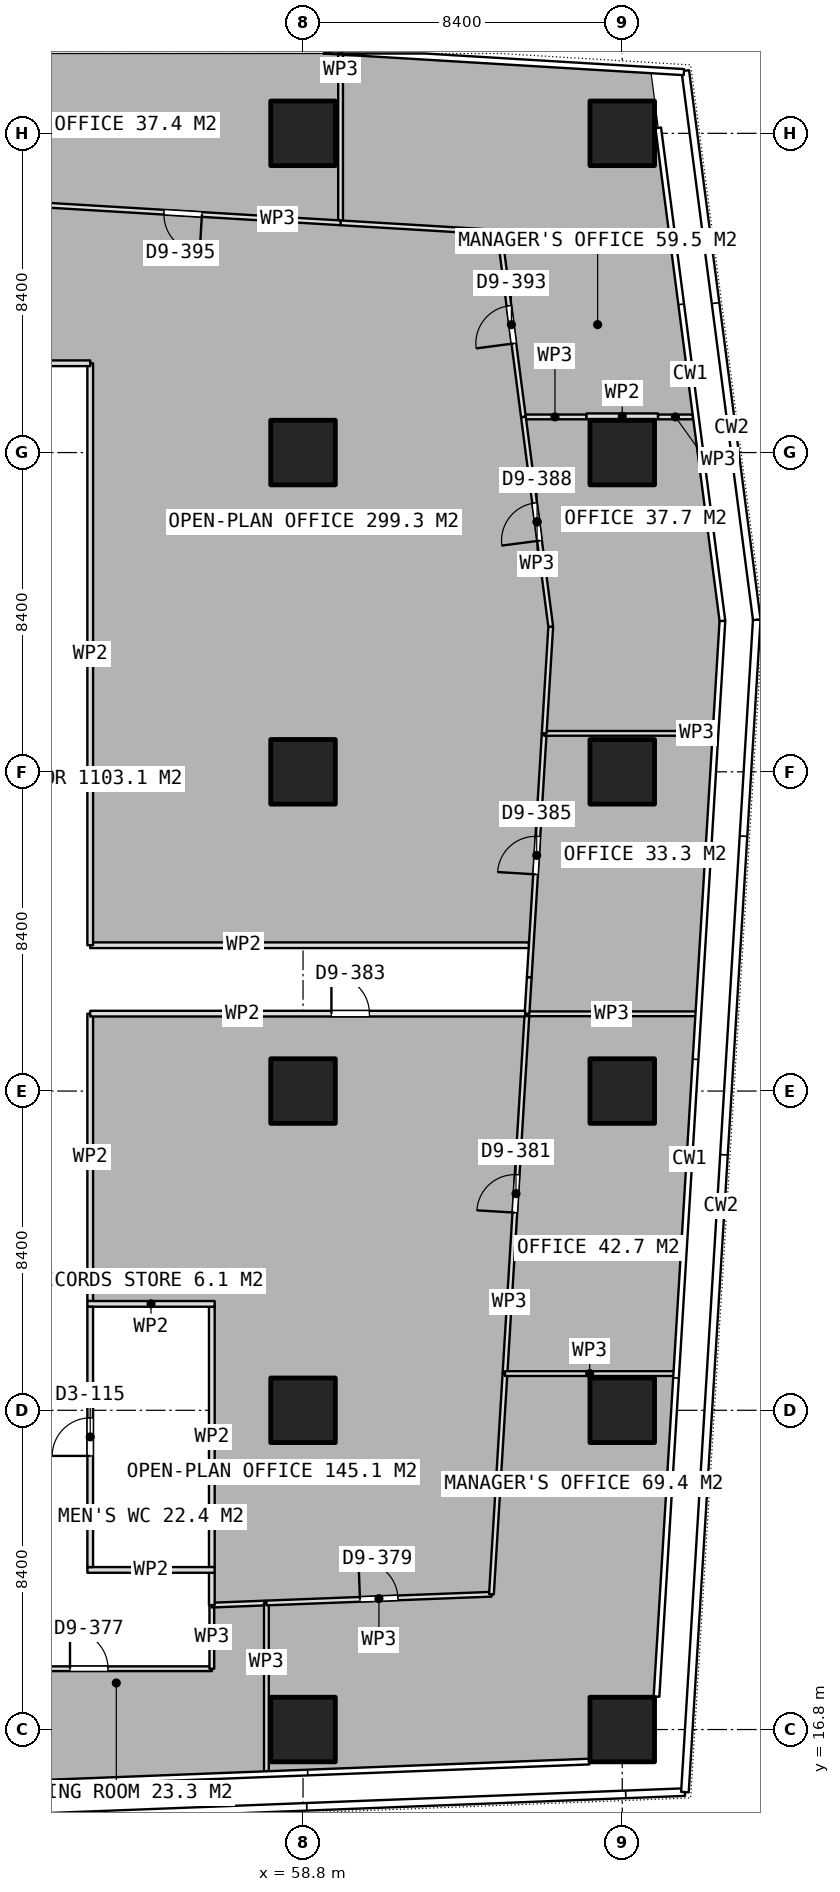
"""IFC4 building model, lengths in metres.
Left out: names, types, materials, properties, quantities, classifications, styles, units other than length and angle.
Written with IfcOpenShell. Run it as: python <this file> out.ifc"""

import sys

from ifc_helpers import new_model, si_unit, direction, frame, frame_2d, origin, origin_2d, place, context, subcontext, project, spatial, rectangle, extrude, element, fill, save


model = new_model("IFC4")
c1 = context("Model", 3, precision=1e-05, world=origin(), true_north=direction((0.0, 1.0)))
c2 = subcontext(c1, "Body", "Model", "MODEL_VIEW")
j1 = project(units=[si_unit("LENGTHUNIT", "METRE"), si_unit("PLANEANGLEUNIT", "RADIAN")], contexts=[c1])
p1 = place(None, origin())
s1 = spatial("IfcSite", under=j1, at=p1, CompositionType="ELEMENT")
p2 = place(p1, origin())
s2 = spatial("IfcBuilding", under=s1, at=p2, CompositionType="ELEMENT")
p3 = place(p2, frame((0.0, 0.0, 110.3)))
s3 = spatial("IfcBuildingStorey", under=s2, at=p3, CompositionType="ELEMENT", Elevation=110.3)
for number, where, z_axis, x_axis in (
    (1, (58.8, 16.8, 0.0), (0.0, 0.0, 1.0), (1.0, 0.0, 0.0)),
    (2, (58.8, 25.2, 0.0), (0.0, 0.0, 1.0), (1.0, 0.0, 0.0)),
    (3, (58.8, 33.6, 0.0), (0.0, 0.0, 1.0), (1.0, 0.0, 0.0)),
    (4, (58.8, 42.0, 0.0), (0.0, 0.0, 1.0), (1.0, 0.0, 0.0)),
    (5, (58.8, 50.4, 0.0), (0.0, 0.0, 1.0), (1.0, 0.0, 0.0)),
    (6, (58.8, 58.8, 0.0), (0.0, 0.0, 1.0), (1.0, 0.0, 0.0)),
    (7, (67.2, 16.8, 0.0), (0.0, 0.0, 1.0), (1.0, 0.0, 0.0)),
    (8, (67.2, 25.2, 0.0), (0.0, 0.0, 1.0), (1.0, 0.0, 0.0)),
    (9, (67.2, 33.6, 0.0), (0.0, 0.0, 1.0), (1.0, 0.0, 0.0)),
    (10, (67.2, 42.0, 0.0), (0.0, 0.0, 1.0), (1.0, 0.0, 0.0)),
    (11, (67.2, 50.4, 0.0), (0.0, 0.0, 1.0), (1.0, 0.0, 0.0)),
    (12, (67.2, 58.8, 0.0), (0.0, 0.0, 1.0), (1.0, 0.0, 0.0)),
):
    element("IfcColumn", number, at=place(p3, frame(where, z_axis=z_axis, x_axis=x_axis)), inside=s3, PredefinedType="COLUMN", context=c2, shape_type="SweptSolid", body=[
        extrude(rectangle(XDim=1.7, YDim=1.7, at=origin_2d()), origin(), (0.0, 0.0, 1.0), 3.75),
    ])
for number, where, z_axis, x_axis in (
    (13, (53.125, 21.0, 0.0), (0.0, 0.0, 1.0), (1.0, 0.0, 0.0)),
    (14, (53.125, 28.0, 0.0), (0.0, 0.0, 1.0), (1.0, 0.0, 0.0)),
):
    element("IfcWall", number, at=place(p3, frame(where, z_axis=z_axis, x_axis=x_axis)), inside=s3, PredefinedType="PARTITIONING", context=c2, shape_type="SweptSolid", body=[
        extrude(rectangle(XDim=3.35, YDim=0.15, at=frame_2d((1.675, 0.0))), origin(), (0.0, 0.0, 1.0), 3.5),
    ])
p4 = place(p3, frame((53.2, 21.075, 0.0), z_axis=(0.0, 0.0, 1.0), x_axis=(0.0, 1.0, 0.0)))
e15 = element("IfcWall", 15, at=p4, inside=s3, PredefinedType="PARTITIONING", context=c2, shape_type="SweptSolid", body=[
    extrude(rectangle(XDim=6.85, YDim=0.15, at=frame_2d((3.425, 0.0))), origin(), (0.0, 0.0, 1.0), 3.5),
])
p5 = place(p4, frame((2.925, 0.0, 0.0)))
e16 = element("IfcOpeningElement", 16, at=p5, cuts=e15, PredefinedType="OPENING", context=c2, shape_type="SweptSolid", body=[
    extrude(rectangle(XDim=1.0, YDim=2.1, at=frame_2d((0.5, 1.05))), frame((0.0, 0.085, 0.0), z_axis=(0.0, -1.0, 0.0), x_axis=(1.0, 0.0, 0.0)), (0.0, 0.0, 1.0), 0.17),
])
p6 = place(p3, frame((56.4, 21.075, 0.0), z_axis=(0.0, 0.0, 1.0), x_axis=(0.0, 1.0, 0.0)))
e17 = element("IfcWall", 17, at=p6, inside=s3, PredefinedType="PARTITIONING", context=c2, shape_type="SweptSolid", body=[
    extrude(rectangle(XDim=6.85, YDim=0.15, at=frame_2d((3.425, 0.0))), origin(), (0.0, 0.0, 1.0), 3.5),
])
p7 = place(p3, frame((49.937, 18.4, 0.0), z_axis=(0.0, 0.0, 1.0), x_axis=(1.0, 0.0, 0.0)))
e18 = element("IfcWall", 18, at=p7, inside=s3, PredefinedType="PARTITIONING", context=c2, shape_type="SweptSolid", body=[
    extrude(rectangle(XDim=6.463, YDim=0.125, at=frame_2d((3.231, 0.0))), origin(), (0.0, 0.0, 1.0), 3.5),
])
p8 = place(p7, frame((2.731, 0.0, 0.0)))
e19 = element("IfcOpeningElement", 19, at=p8, cuts=e18, PredefinedType="OPENING", context=c2, shape_type="SweptSolid", body=[
    extrude(rectangle(XDim=1.0, YDim=2.1, at=frame_2d((0.5, 1.05))), frame((0.0, 0.073, 0.0), z_axis=(0.0, -1.0, 0.0), x_axis=(1.0, 0.0, 0.0)), (0.0, 0.0, 1.0), 0.145),
])
p9 = place(p3, frame((56.4, 18.4, 0.0), z_axis=(0.0, 0.0, 1.0), x_axis=(0.0, 1.0, 0.0)))
e20 = element("IfcWall", 20, at=p9, inside=s3, PredefinedType="PARTITIONING", context=c2, shape_type="SweptSolid", body=[
    extrude(rectangle(XDim=1.674, YDim=0.125, at=frame_2d((0.837, 0.0))), origin(), (0.0, 0.0, 1.0), 3.5),
])
p10 = place(p3, frame((56.4, 20.074, 0.0), z_axis=(0.0, 0.0, 1.0), x_axis=(0.999242997058, 0.038902864047, 0.0)))
e21 = element("IfcWall", 21, at=p10, inside=s3, PredefinedType="PARTITIONING", context=c2, shape_type="SweptSolid", body=[
    extrude(rectangle(XDim=1.437, YDim=0.125, at=frame_2d((0.719, 0.0))), origin(), (0.0, 0.0, 1.0), 3.5),
])
p11 = place(p3, frame((57.836, 20.13, 0.0), z_axis=(0.0, 0.0, 1.0), x_axis=(0.0, -1.0, 0.0)))
e22 = element("IfcWall", 22, at=p11, inside=s3, PredefinedType="PARTITIONING", context=c2, shape_type="SweptSolid", body=[
    extrude(rectangle(XDim=4.424, YDim=0.125, at=frame_2d((2.212, 0.0))), origin(), (0.0, 0.0, 1.0), 3.5),
])
p12 = place(p3, frame((57.837, 20.13, 0.0), z_axis=(0.0, 0.0, 1.0), x_axis=(0.999244959279, 0.038852430487, 0.0)))
e23 = element("IfcWall", 23, at=p12, inside=s3, PredefinedType="PARTITIONING", context=c2, shape_type="SweptSolid", body=[
    extrude(rectangle(XDim=5.926, YDim=0.125, at=frame_2d((2.963, 0.0))), origin(), (0.0, 0.0, 1.0), 3.5),
])
p13 = place(p12, frame((2.463, 0.0, 0.0)))
e24 = element("IfcOpeningElement", 24, at=p13, cuts=e23, PredefinedType="OPENING", context=c2, shape_type="SweptSolid", body=[
    extrude(rectangle(XDim=1.0, YDim=2.1, at=frame_2d((0.5, 1.05))), frame((0.0, 0.073, 0.0), z_axis=(0.0, -1.0, 0.0), x_axis=(1.0, 0.0, 0.0)), (0.0, 0.0, 1.0), 0.145),
])
p14 = place(p3, frame((63.758, 20.36, 0.0), z_axis=(0.0, 0.0, 1.0), x_axis=(0.06119454608, 0.99812585756, 0.0)))
e25 = element("IfcWall", 25, at=p14, inside=s3, PredefinedType="PARTITIONING", context=c2, shape_type="SweptSolid", body=[
    extrude(rectangle(XDim=5.817, YDim=0.125, at=frame_2d((2.908, 0.0))), origin(), (0.0, 0.0, 1.0), 3.5),
])
p15 = place(p3, frame((64.114, 26.166, 0.0), z_axis=(0.0, 0.0, 1.0), x_axis=(1.0, 0.0, 0.0)))
e26 = element("IfcWall", 26, at=p15, inside=s3, PredefinedType="PARTITIONING", context=c2, shape_type="SweptSolid", body=[
    extrude(rectangle(XDim=4.458, YDim=0.125, at=frame_2d((2.229, 0.0))), origin(), (0.0, 0.0, 1.0), 3.5),
])
p16 = place(p3, frame((64.114, 26.167, 0.0), z_axis=(0.0, 0.0, 1.0), x_axis=(0.061165020441, 0.998127667322, 0.0)))
e27 = element("IfcWall", 27, at=p16, inside=s3, PredefinedType="PARTITIONING", context=c2, shape_type="SweptSolid", body=[
    extrude(rectangle(XDim=9.484, YDim=0.125, at=frame_2d((4.742, 0.0))), origin(), (0.0, 0.0, 1.0), 3.5),
])
p17 = place(p16, frame((4.242, 0.0, 0.0)))
e28 = element("IfcOpeningElement", 28, at=p17, cuts=e27, PredefinedType="OPENING", context=c2, shape_type="SweptSolid", body=[
    extrude(rectangle(XDim=1.0, YDim=2.1, at=frame_2d((0.5, 1.05))), frame((0.0, 0.073, 0.0), z_axis=(0.0, -1.0, 0.0), x_axis=(1.0, 0.0, 0.0)), (0.0, 0.0, 1.0), 0.145),
])
p18 = place(p3, frame((64.694, 35.633, 0.0), z_axis=(0.0, 0.0, 1.0), x_axis=(1.0, 0.0, 0.0)))
e29 = element("IfcWall", 29, at=p18, inside=s3, PredefinedType="PARTITIONING", context=c2, shape_type="SweptSolid", body=[
    extrude(rectangle(XDim=4.458, YDim=0.125, at=frame_2d((2.229, 0.0))), origin(), (0.0, 0.0, 1.0), 3.5),
])
p19 = place(p3, frame((64.753, 36.589, 0.0), z_axis=(0.0, 0.0, 1.0), x_axis=(0.061083835669, 0.998132638991, 0.0)))
e30 = element("IfcWall", 30, at=p19, inside=s3, PredefinedType="PARTITIONING", context=c2, shape_type="SweptSolid", body=[
    extrude(rectangle(XDim=6.435, YDim=0.125, at=frame_2d((3.217, 0.0))), origin(), (0.0, 0.0, 1.0), 3.5),
])
p20 = place(p19, frame((2.718, 0.0, 0.0)))
e31 = element("IfcOpeningElement", 31, at=p20, cuts=e30, PredefinedType="OPENING", context=c2, shape_type="SweptSolid", body=[
    extrude(rectangle(XDim=1.0, YDim=2.1, at=frame_2d((0.5, 1.05))), frame((0.0, 0.073, 0.0), z_axis=(0.0, -1.0, 0.0), x_axis=(1.0, 0.0, 0.0)), (0.0, 0.0, 1.0), 0.145),
])
p21 = place(p3, frame((65.146, 43.012, 0.0), z_axis=(0.0, 0.0, 1.0), x_axis=(1.0, 0.0, 0.0)))
e32 = element("IfcWall", 32, at=p21, inside=s3, PredefinedType="PARTITIONING", context=c2, shape_type="SweptSolid", body=[
    extrude(rectangle(XDim=4.458, YDim=0.125, at=frame_2d((2.229, 0.0))), origin(), (0.0, 0.0, 1.0), 3.5),
])
p22 = place(p3, frame((64.694, 35.634, 0.0), z_axis=(0.0, 0.0, 1.0), x_axis=(0.061488745964, 0.998107776806, 0.0)))
e33 = element("IfcWall", 33, at=p22, inside=s3, PredefinedType="PARTITIONING", context=c2, shape_type="SweptSolid", body=[
    extrude(rectangle(XDim=0.957, YDim=0.125, at=frame_2d((0.479, 0.0))), origin(), (0.0, 0.0, 1.0), 3.5),
])
p23 = place(p3, frame((64.599, 51.338, 0.0), z_axis=(0.0, 0.0, 1.0), x_axis=(1.0, 0.0, 0.0)))
e34 = element("IfcWall", 34, at=p23, inside=s3, PredefinedType="PARTITIONING", context=c2, shape_type="SweptSolid", body=[
    extrude(rectangle(XDim=1.661, YDim=0.125, at=frame_2d((0.831, 0.0))), origin(), (0.0, 0.0, 1.0), 3.5),
])
p24 = place(p3, frame((68.14, 51.338, 0.0), z_axis=(0.0, 0.0, 1.0), x_axis=(1.0, 0.0, 0.0)))
e35 = element("IfcWall", 35, at=p24, inside=s3, PredefinedType="PARTITIONING", context=c2, shape_type="SweptSolid", body=[
    extrude(rectangle(XDim=0.917, YDim=0.125, at=frame_2d((0.458, 0.0))), origin(), (0.0, 0.0, 1.0), 3.5),
])
p25 = place(p3, frame((65.146, 43.013, 0.0), z_axis=(0.0, 0.0, 1.0), x_axis=(0.061242528703, 0.998122914614, 0.0)))
e36 = element("IfcWall", 36, at=p25, inside=s3, PredefinedType="PARTITIONING", context=c2, shape_type="SweptSolid", body=[
    extrude(rectangle(XDim=2.811, YDim=0.125, at=frame_2d((1.405, 0.0))), origin(), (0.0, 0.0, 1.0), 3.5),
])
p26 = place(p3, frame((65.318, 45.818, 0.0), z_axis=(0.0, 0.0, 1.0), x_axis=(-0.129166678345, 0.991622896673, 0.0)))
e37 = element("IfcWall", 37, at=p26, inside=s3, PredefinedType="PARTITIONING", context=c2, shape_type="SweptSolid", body=[
    extrude(rectangle(XDim=5.566, YDim=0.125, at=frame_2d((2.783, 0.0))), origin(), (0.0, 0.0, 1.0), 3.5),
])
p27 = place(p26, frame((2.283, 0.0, 0.0)))
e38 = element("IfcOpeningElement", 38, at=p27, cuts=e37, PredefinedType="OPENING", context=c2, shape_type="SweptSolid", body=[
    extrude(rectangle(XDim=1.0, YDim=2.1, at=frame_2d((0.5, 1.05))), frame((0.0, 0.073, 0.0), z_axis=(0.0, -1.0, 0.0), x_axis=(1.0, 0.0, 0.0)), (0.0, 0.0, 1.0), 0.145),
])
p28 = place(p3, frame((59.788, 56.445, 0.0), z_axis=(0.0, 0.0, 1.0), x_axis=(0.0, 1.0, 0.0)))
e39 = element("IfcWall", 39, at=p28, inside=s3, PredefinedType="PARTITIONING", context=c2, shape_type="SweptSolid", body=[
    extrude(rectangle(XDim=4.458, YDim=0.125, at=frame_2d((2.229, 0.0))), origin(), (0.0, 0.0, 1.0), 3.5),
])
p29 = place(p3, frame((64.599, 51.339, 0.0), z_axis=(0.0, 0.0, 1.0), x_axis=(-0.129102549566, 0.991631247841, 0.0)))
e40 = element("IfcWall", 40, at=p29, inside=s3, PredefinedType="PARTITIONING", context=c2, shape_type="SweptSolid", body=[
    extrude(rectangle(XDim=4.896, YDim=0.125, at=frame_2d((2.448, 0.0))), origin(), (0.0, 0.0, 1.0), 3.5),
])
p30 = place(p29, frame((1.948, 0.0, 0.0)))
e41 = element("IfcOpeningElement", 41, at=p30, cuts=e40, PredefinedType="OPENING", context=c2, shape_type="SweptSolid", body=[
    extrude(rectangle(XDim=1.0, YDim=2.1, at=frame_2d((0.5, 1.05))), frame((0.0, 0.073, 0.0), z_axis=(0.0, -1.0, 0.0), x_axis=(1.0, 0.0, 0.0)), (0.0, 0.0, 1.0), 0.145),
])
p31 = place(p3, frame((63.967, 56.194, 0.0), z_axis=(0.0, 0.0, 1.0), x_axis=(-0.998201427139, 0.059949235678, 0.0)))
e42 = element("IfcWall", 42, at=p31, inside=s3, PredefinedType="PARTITIONING", context=c2, shape_type="SweptSolid", body=[
    extrude(rectangle(XDim=4.187, YDim=0.125, at=frame_2d((2.093, 0.0))), origin(), (0.0, 0.0, 1.0), 3.5),
])
p32 = place(p3, frame((59.787, 56.445, 0.0), z_axis=(0.0, 0.0, 1.0), x_axis=(-0.998194005673, 0.060072681298, 0.0)))
e43 = element("IfcWall", 43, at=p32, inside=s3, PredefinedType="PARTITIONING", context=c2, shape_type="SweptSolid", body=[
    extrude(rectangle(XDim=8.307, YDim=0.125, at=frame_2d((4.153, 0.0))), origin(), (0.0, 0.0, 1.0), 3.5),
])
p33 = place(p32, frame((3.654, 0.0, 0.0)))
e44 = element("IfcOpeningElement", 44, at=p33, cuts=e43, PredefinedType="OPENING", context=c2, shape_type="SweptSolid", body=[
    extrude(rectangle(XDim=1.0, YDim=2.1, at=frame_2d((0.5, 1.05))), frame((0.0, 0.073, 0.0), z_axis=(0.0, -1.0, 0.0), x_axis=(1.0, 0.0, 0.0)), (0.0, 0.0, 1.0), 0.145),
])
p34 = place(p3, frame((66.26, 51.355, 0.0), z_axis=(0.0, 0.0, 1.0), x_axis=(1.0, 0.0, 0.0)))
e45 = element("IfcWall", 45, at=p34, inside=s3, PredefinedType="PARTITIONING", context=c2, shape_type="SweptSolid", body=[
    extrude(rectangle(XDim=1.88, YDim=0.15, at=frame_2d((0.94, 0.0))), origin(), (0.0, 0.0, 1.0), 3.5),
])
p35 = place(p3, frame((64.742, 37.437, 0.0), z_axis=(0.0, 0.0, 1.0), x_axis=(-1.0, 0.0, 0.0)))
e46 = element("IfcWall", 46, at=p35, inside=s3, PredefinedType="PARTITIONING", context=c2, shape_type="SweptSolid", body=[
    extrude(rectangle(XDim=11.542, YDim=0.15, at=frame_2d((5.771, 0.0))), origin(), (0.0, 0.0, 1.0), 3.5),
])
p36 = place(p3, frame((53.2, 37.437, 0.0), z_axis=(0.0, 0.0, 1.0), x_axis=(0.0, 1.0, 0.0)))
e47 = element("IfcWall", 47, at=p36, inside=s3, PredefinedType="PARTITIONING", context=c2, shape_type="SweptSolid", body=[
    extrude(rectangle(XDim=15.313, YDim=0.15, at=frame_2d((7.656, 0.0))), origin(), (0.0, 0.0, 1.0), 3.5),
])
p37 = place(p3, frame((53.2, 52.75, 0.0), z_axis=(0.0, 0.0, 1.0), x_axis=(-1.0, 0.0, 0.0)))
e48 = element("IfcWall", 48, at=p37, inside=s3, PredefinedType="PARTITIONING", context=c2, shape_type="SweptSolid", body=[
    extrude(rectangle(XDim=17.574, YDim=0.15, at=frame_2d((8.787, 0.0))), origin(), (0.0, 0.0, 1.0), 3.5),
])
p38 = place(p37, frame((8.287, 0.0, 0.0)))
e49 = element("IfcOpeningElement", 49, at=p38, cuts=e48, PredefinedType="OPENING", context=c2, shape_type="SweptSolid", body=[
    extrude(rectangle(XDim=1.0, YDim=2.1, at=frame_2d((0.5, 1.05))), frame((0.0, 0.085, 0.0), z_axis=(0.0, -1.0, 0.0), x_axis=(1.0, 0.0, 0.0)), (0.0, 0.0, 1.0), 0.17),
])
p39 = place(p3, frame((56.4, 20.074, 0.0), z_axis=(0.0, 0.0, 1.0), x_axis=(0.0, 1.0, 0.0)))
e50 = element("IfcWall", 50, at=p39, inside=s3, PredefinedType="PARTITIONING", context=c2, shape_type="SweptSolid", body=[
    extrude(rectangle(XDim=0.851, YDim=0.15, at=frame_2d((0.426, 0.0))), origin(), (0.0, 0.0, 1.0), 3.5),
])
p40 = place(p3, frame((53.2, 28.075, 0.0), z_axis=(0.0, 0.0, 1.0), x_axis=(0.0, 1.0, 0.0)))
e51 = element("IfcWall", 51, at=p40, inside=s3, PredefinedType="PARTITIONING", context=c2, shape_type="SweptSolid", body=[
    extrude(rectangle(XDim=7.562, YDim=0.15, at=frame_2d((3.781, 0.0))), origin(), (0.0, 0.0, 1.0), 3.5),
])
p41 = place(p3, frame((53.2, 35.637, 0.0), z_axis=(0.0, 0.0, 1.0), x_axis=(1.0, 0.0, 0.0)))
e52 = element("IfcWall", 52, at=p41, inside=s3, PredefinedType="PARTITIONING", context=c2, shape_type="SweptSolid", body=[
    extrude(rectangle(XDim=11.445, YDim=0.15, at=frame_2d((5.723, 0.0))), origin(), (0.0, 0.0, 1.0), 3.5),
])
p42 = place(p41, frame((6.347, 0.0, 0.0)))
e53 = element("IfcOpeningElement", 53, at=p42, cuts=e52, PredefinedType="OPENING", context=c2, shape_type="SweptSolid", body=[
    extrude(rectangle(XDim=1.0, YDim=2.1, at=frame_2d((0.5, 1.05))), frame((0.0, 0.085, 0.0), z_axis=(0.0, -1.0, 0.0), x_axis=(1.0, 0.0, 0.0)), (0.0, 0.0, 1.0), 0.17),
])
p43 = place(p5, origin())
e54 = element("IfcDoor", 54, at=p43, inside=s3, OperationType="SINGLE_SWING_LEFT", PredefinedType="DOOR", context=c2, shape_type="SweptSolid", body=[
    extrude(rectangle(XDim=1.0, YDim=2.1, at=frame_2d((0.5, 1.05))), frame((0.0, 0.025, 0.0), z_axis=(0.0, -1.0, 0.0), x_axis=(1.0, 0.0, 0.0)), (0.0, 0.0, 1.0), 0.05),
])
fill(e16, e54)
p44 = place(p8, origin())
e55 = element("IfcDoor", 55, at=p44, inside=s3, OperationType="SINGLE_SWING_LEFT", PredefinedType="DOOR", context=c2, shape_type="SweptSolid", body=[
    extrude(rectangle(XDim=1.0, YDim=2.1, at=frame_2d((0.5, 1.05))), frame((0.0, 0.025, 0.0), z_axis=(0.0, -1.0, 0.0), x_axis=(1.0, 0.0, 0.0)), (0.0, 0.0, 1.0), 0.05),
])
fill(e19, e55)
p45 = place(p13, origin())
e56 = element("IfcDoor", 56, at=p45, inside=s3, OperationType="SINGLE_SWING_LEFT", PredefinedType="DOOR", context=c2, shape_type="SweptSolid", body=[
    extrude(rectangle(XDim=1.0, YDim=2.1, at=frame_2d((0.5, 1.05))), frame((0.0, 0.025, 0.0), z_axis=(0.0, -1.0, 0.0), x_axis=(1.0, 0.0, 0.0)), (0.0, 0.0, 1.0), 0.05),
])
fill(e24, e56)
p46 = place(p17, origin())
e57 = element("IfcDoor", 57, at=p46, inside=s3, OperationType="SINGLE_SWING_LEFT", PredefinedType="DOOR", context=c2, shape_type="SweptSolid", body=[
    extrude(rectangle(XDim=1.0, YDim=2.1, at=frame_2d((0.5, 1.05))), frame((0.0, 0.025, 0.0), z_axis=(0.0, -1.0, 0.0), x_axis=(1.0, 0.0, 0.0)), (0.0, 0.0, 1.0), 0.05),
])
fill(e28, e57)
p47 = place(p20, origin())
e58 = element("IfcDoor", 58, at=p47, inside=s3, OperationType="SINGLE_SWING_LEFT", PredefinedType="DOOR", context=c2, shape_type="SweptSolid", body=[
    extrude(rectangle(XDim=1.0, YDim=2.1, at=frame_2d((0.5, 1.05))), frame((0.0, 0.025, 0.0), z_axis=(0.0, -1.0, 0.0), x_axis=(1.0, 0.0, 0.0)), (0.0, 0.0, 1.0), 0.05),
])
fill(e31, e58)
p48 = place(p27, origin())
e59 = element("IfcDoor", 59, at=p48, inside=s3, OperationType="SINGLE_SWING_LEFT", PredefinedType="DOOR", context=c2, shape_type="SweptSolid", body=[
    extrude(rectangle(XDim=1.0, YDim=2.1, at=frame_2d((0.5, 1.05))), frame((0.0, 0.025, 0.0), z_axis=(0.0, -1.0, 0.0), x_axis=(1.0, 0.0, 0.0)), (0.0, 0.0, 1.0), 0.05),
])
fill(e38, e59)
p49 = place(p30, origin())
e60 = element("IfcDoor", 60, at=p49, inside=s3, OperationType="SINGLE_SWING_LEFT", PredefinedType="DOOR", context=c2, shape_type="SweptSolid", body=[
    extrude(rectangle(XDim=1.0, YDim=2.1, at=frame_2d((0.5, 1.05))), frame((0.0, 0.025, 0.0), z_axis=(0.0, -1.0, 0.0), x_axis=(1.0, 0.0, 0.0)), (0.0, 0.0, 1.0), 0.05),
])
fill(e41, e60)
p50 = place(p33, origin())
e61 = element("IfcDoor", 61, at=p50, inside=s3, OperationType="SINGLE_SWING_LEFT", PredefinedType="DOOR", context=c2, shape_type="SweptSolid", body=[
    extrude(rectangle(XDim=1.0, YDim=2.1, at=frame_2d((0.5, 1.05))), frame((0.0, 0.025, 0.0), z_axis=(0.0, -1.0, 0.0), x_axis=(1.0, 0.0, 0.0)), (0.0, 0.0, 1.0), 0.05),
])
fill(e44, e61)
p51 = place(p42, origin())
e62 = element("IfcDoor", 62, at=p51, inside=s3, OperationType="SINGLE_SWING_LEFT", PredefinedType="DOOR", context=c2, shape_type="SweptSolid", body=[
    extrude(rectangle(XDim=1.0, YDim=2.1, at=frame_2d((0.5, 1.05))), frame((0.0, 0.025, 0.0), z_axis=(0.0, -1.0, 0.0), x_axis=(1.0, 0.0, 0.0)), (0.0, 0.0, 1.0), 0.05),
])
fill(e53, e62)
save(model, sys.argv[1])
